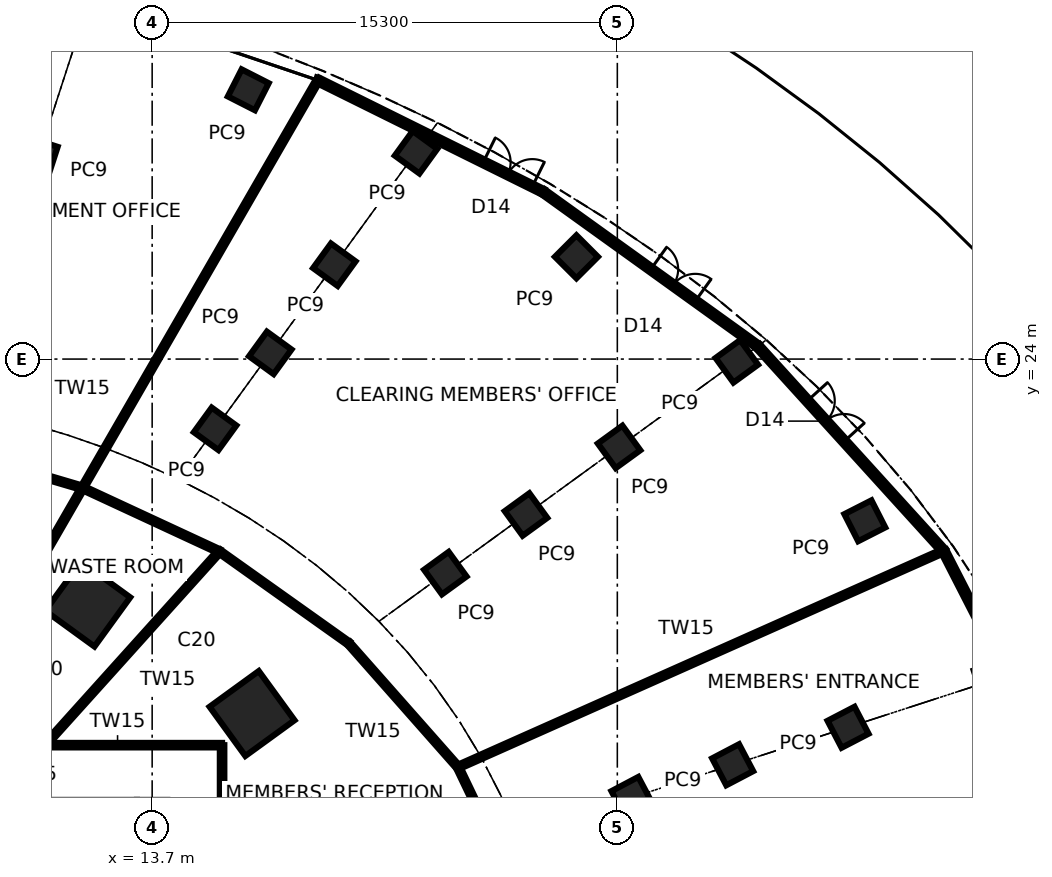
"""IFC4 building model, lengths in metres.
Left out: names, types, materials, properties, quantities, classifications, styles, units other than length and angle.
Written with IfcOpenShell. Run it as: python <this file> out.ifc"""

import sys

from ifc_helpers import new_model, si_unit, direction, frame, frame_2d, origin, origin_2d, place, context, subcontext, project, spatial, rectangle, extrude, element, fill, save


model = new_model("IFC4")
c1 = context("Model", 3, precision=1e-05, world=origin(), true_north=direction((0.0, 1.0)))
c2 = subcontext(c1, "Body", "Model", "MODEL_VIEW")
j1 = project(units=[si_unit("LENGTHUNIT", "METRE"), si_unit("PLANEANGLEUNIT", "RADIAN")], contexts=[c1])
p1 = place(None, origin())
s1 = spatial("IfcSite", under=j1, at=p1, CompositionType="ELEMENT")
p2 = place(p1, origin())
s2 = spatial("IfcBuilding", under=s1, at=p2, CompositionType="ELEMENT")
p3 = place(p2, origin())
s3 = spatial("IfcBuildingStorey", under=s2, at=p3, CompositionType="ELEMENT", Elevation=0.0)
for number, where, z_axis, x_axis in (
    (1, (16.986, 12.341, 0.0), (0.0, 0.0, 1.0), (0.809, 0.588, 0.0)),
    (2, (11.581, 15.94, 0.0), (0.0, 0.0, 1.0), (0.588, 0.809, 0.0)),
):
    element("IfcColumn", number, at=place(p3, frame(where, z_axis=z_axis, x_axis=x_axis)), inside=s3, PredefinedType="COLUMN", context=c2, shape_type="SweptSolid", body=[
        extrude(rectangle(XDim=2.0, YDim=2.0, at=origin_2d()), origin(), (0.0, 0.0, 1.0), 5.6),
    ])
for number, where, z_axis, x_axis in (
    (3, (37.141, 18.68, 0.0), (0.0, 0.0, 1.0), (0.891, 0.454, 0.0)),
    (4, (32.93, 23.925, 0.0), (0.0, 0.0, 1.0), (0.809, 0.588, 0.0)),
    (5, (27.655, 27.364, 0.0), (0.0, 0.0, 1.0), (0.707, 0.707, 0.0)),
    (6, (22.38, 30.803, 0.0), (0.0, 0.0, 1.0), (0.588, 0.809, 0.0)),
    (7, (16.862, 32.857, 0.0), (0.0, 0.0, 1.0), (0.454, 0.891, 0.0)),
    (8, (36.589, 11.888, 0.0), (0.0, 0.0, 1.0), (0.887, 0.461, 0.0)),
    (9, (29.057, 21.111, 0.0), (0.0, 0.0, 1.0), (0.809, 0.588, 0.0)),
    (10, (19.692, 27.103, 0.0), (0.0, 0.0, 1.0), (0.588, 0.809, 0.0)),
    (11, (9.962, 30.66, 0.0), (0.0, 0.0, 1.0), (0.309, 0.951, 0.0)),
    (12, (32.794, 10.655, 0.0), (0.0, 0.0, 1.0), (0.885, 0.465, 0.0)),
    (13, (25.997, 18.888, 0.0), (0.0, 0.0, 1.0), (0.809, 0.588, 0.0)),
    (14, (17.585, 24.204, 0.0), (0.0, 0.0, 1.0), (0.588, 0.809, 0.0)),
    (15, (29.482, 9.579, 0.0), (0.0, 0.0, 1.0), (0.884, 0.467, 0.0)),
    (16, (23.342, 16.959, 0.0), (0.0, 0.0, 1.0), (0.809, 0.588, 0.0)),
    (17, (15.77, 21.705, 0.0), (0.0, 0.0, 1.0), (0.588, 0.809, 0.0)),
):
    element("IfcColumn", number, at=place(p3, frame(where, z_axis=z_axis, x_axis=x_axis)), inside=s3, PredefinedType="COLUMN", context=c2, shape_type="SweptSolid", body=[
        extrude(rectangle(XDim=1.0, YDim=1.0, at=origin_2d()), origin(), (0.0, 0.0, 1.0), 5.6),
    ])
p4 = place(p3, frame((44.002, 9.353, 0.0), z_axis=(0.0, 0.0, 1.0), x_axis=(-0.455866804963, 0.890048007769, 0.0)))
e18 = element("IfcWall", 18, at=p4, inside=s3, PredefinedType="SOLIDWALL", context=c2, shape_type="SweptSolid", body=[
    extrude(rectangle(XDim=9.367, YDim=0.2, at=frame_2d((4.683, 0.0))), origin(), (0.0, 0.0, 1.0), 5.4),
])
p5 = place(p4, frame((0.4, 0.0, 0.0)))
e19 = element("IfcOpeningElement", 19, at=p5, cuts=e18, PredefinedType="OPENING", context=c2, shape_type="SweptSolid", body=[
    extrude(rectangle(XDim=1.8, YDim=2.7, at=frame_2d((0.9, 1.35))), frame((0.0, 0.11, 0.0), z_axis=(0.0, -1.0, 0.0), x_axis=(1.0, 0.0, 0.0)), (0.0, 0.0, 1.0), 0.22),
])
p6 = place(p3, frame((39.732, 17.69, 0.0), z_axis=(0.0, 0.0, 1.0), x_axis=(-0.672185050873, 0.740383182806, 0.0)))
e20 = element("IfcWall", 20, at=p6, inside=s3, PredefinedType="SOLIDWALL", context=c2, shape_type="SweptSolid", body=[
    extrude(rectangle(XDim=9.096, YDim=0.2, at=frame_2d((4.548, 0.0))), origin(), (0.0, 0.0, 1.0), 5.4),
])
p7 = place(p6, frame((4.866, 0.0, 0.0)))
e21 = element("IfcOpeningElement", 21, at=p7, cuts=e20, PredefinedType="OPENING", context=c2, shape_type="SweptSolid", body=[
    extrude(rectangle(XDim=1.8, YDim=2.7, at=frame_2d((0.9, 1.35))), frame((0.0, 0.11, 0.0), z_axis=(0.0, -1.0, 0.0), x_axis=(1.0, 0.0, 0.0)), (0.0, 0.0, 1.0), 0.22),
])
p8 = place(p3, frame((33.618, 24.425, 0.0), z_axis=(0.0, 0.0, 1.0), x_axis=(-0.811842698993, 0.583876212987, 0.0)))
e22 = element("IfcWall", 22, at=p8, inside=s3, PredefinedType="SOLIDWALL", context=c2, shape_type="SweptSolid", body=[
    extrude(rectangle(XDim=8.692, YDim=0.2, at=frame_2d((4.346, 0.0))), origin(), (0.0, 0.0, 1.0), 5.4),
])
p9 = place(p8, frame((2.532, 0.0, 0.0)))
e23 = element("IfcOpeningElement", 23, at=p9, cuts=e22, PredefinedType="OPENING", context=c2, shape_type="SweptSolid", body=[
    extrude(rectangle(XDim=1.8, YDim=2.7, at=frame_2d((0.9, 1.35))), frame((0.0, 0.11, 0.0), z_axis=(0.0, -1.0, 0.0), x_axis=(1.0, 0.0, 0.0)), (0.0, 0.0, 1.0), 0.22),
])
p10 = place(p3, frame((26.562, 29.5, 0.0), z_axis=(0.0, 0.0, 1.0), x_axis=(-0.896091912652, 0.443868543693, 0.0)))
e24 = element("IfcWall", 24, at=p10, inside=s3, PredefinedType="SOLIDWALL", context=c2, shape_type="SweptSolid", body=[
    extrude(rectangle(XDim=8.27, YDim=0.2, at=frame_2d((4.135, 0.0))), origin(), (0.0, 0.0, 1.0), 5.4),
])
p11 = place(p10, frame((0.4, 0.0, 0.0)))
e25 = element("IfcOpeningElement", 25, at=p11, cuts=e24, PredefinedType="OPENING", context=c2, shape_type="SweptSolid", body=[
    extrude(rectangle(XDim=1.8, YDim=2.7, at=frame_2d((0.9, 1.35))), frame((0.0, 0.11, 0.0), z_axis=(0.0, -1.0, 0.0), x_axis=(1.0, 0.0, 0.0)), (0.0, 0.0, 1.0), 0.22),
])
p12 = place(p3, frame((25.76, 6.409, 0.0), z_axis=(0.0, 0.0, 1.0), x_axis=(-0.432499372538, 0.901634234462, 0.0)))
e26 = element("IfcWall", 26, at=p12, inside=s3, PredefinedType="PARTITIONING", context=c2, shape_type="SweptSolid", body=[
    extrude(rectangle(XDim=4.625, YDim=0.15, at=frame_2d((2.312, 0.0))), origin(), (0.0, 0.0, 1.0), 5.4),
])
p13 = place(p12, frame((1.712, 0.0, 0.0)))
e27 = element("IfcOpeningElement", 27, at=p13, cuts=e26, PredefinedType="OPENING", context=c2, shape_type="SweptSolid", body=[
    extrude(rectangle(XDim=1.2, YDim=2.4, at=frame_2d((0.6, 1.2))), frame((0.0, 0.085, 0.0), z_axis=(0.0, -1.0, 0.0), x_axis=(1.0, 0.0, 0.0)), (0.0, 0.0, 1.0), 0.17),
])
p14 = place(p3, frame((23.76, 10.579, 0.0), z_axis=(0.0, 0.0, 1.0), x_axis=(0.913545837632, 0.406735789604, 0.0)))
e28 = element("IfcWall", 28, at=p14, inside=s3, PredefinedType="PARTITIONING", context=c2, shape_type="SweptSolid", body=[
    extrude(rectangle(XDim=17.404, YDim=0.15, at=frame_2d((8.702, 0.0))), origin(), (0.0, 0.0, 1.0), 5.4),
])
p15 = place(p3, frame((16.0, 3.401, 0.0), z_axis=(0.0, 0.0, 1.0), x_axis=(0.0, 1.0, 0.0)))
e29 = element("IfcWall", 29, at=p15, inside=s3, PredefinedType="PARTITIONING", context=c2, shape_type="SweptSolid", body=[
    extrude(rectangle(XDim=7.899, YDim=0.15, at=frame_2d((3.95, 0.0))), origin(), (0.0, 0.0, 1.0), 5.4),
])
p16 = place(p15, frame((3.375, 0.0, 0.0)))
e30 = element("IfcOpeningElement", 30, at=p16, cuts=e29, PredefinedType="OPENING", context=c2, shape_type="SweptSolid", body=[
    extrude(rectangle(XDim=1.2, YDim=2.4, at=frame_2d((0.6, 1.2))), frame((0.0, 0.085, 0.0), z_axis=(0.0, -1.0, 0.0), x_axis=(1.0, 0.0, 0.0)), (0.0, 0.0, 1.0), 0.17),
])
p17 = place(p3, frame((23.76, 10.579, 0.0), z_axis=(0.0, 0.0, 1.0), x_axis=(-0.661972392396, 0.749528219419, 0.0)))
e31 = element("IfcWall", 31, at=p17, inside=s3, PredefinedType="PARTITIONING", context=c2, shape_type="SweptSolid", body=[
    extrude(rectangle(XDim=5.432, YDim=0.15, at=frame_2d((2.716, 0.0))), origin(), (0.0, 0.0, 1.0), 5.4),
])
p18 = place(p3, frame((20.164, 14.65, 0.0), z_axis=(0.0, 0.0, 1.0), x_axis=(-0.81494599189, 0.579536910215, 0.0)))
e32 = element("IfcWall", 32, at=p18, inside=s3, PredefinedType="PARTITIONING", context=c2, shape_type="SweptSolid", body=[
    extrude(rectangle(XDim=5.217, YDim=0.15, at=frame_2d((2.608, 0.0))), origin(), (0.0, 0.0, 1.0), 5.4),
])
p19 = place(p3, frame((10.175, 11.3, 0.0), z_axis=(0.0, 0.0, 1.0), x_axis=(0.669128292476, 0.7431469089, 0.0)))
e33 = element("IfcWall", 33, at=p19, inside=s3, PredefinedType="PARTITIONING", context=c2, shape_type="SweptSolid", body=[
    extrude(rectangle(XDim=8.576, YDim=0.15, at=frame_2d((4.288, 0.0))), origin(), (0.0, 0.0, 1.0), 5.4),
])
p20 = place(p3, frame((15.913, 17.673, 0.0), z_axis=(0.0, 0.0, 1.0), x_axis=(-0.907108234971, 0.420897434119, 0.0)))
e34 = element("IfcWall", 34, at=p20, inside=s3, PredefinedType="PARTITIONING", context=c2, shape_type="SweptSolid", body=[
    extrude(rectangle(XDim=4.964, YDim=0.15, at=frame_2d((2.482, 0.0))), origin(), (0.0, 0.0, 1.0), 5.4),
])
p21 = place(p3, frame((16.0, 11.3, 0.0), z_axis=(0.0, 0.0, 1.0), x_axis=(-1.0, 0.0, 0.0)))
e35 = element("IfcWall", 35, at=p21, inside=s3, PredefinedType="PARTITIONING", context=c2, shape_type="SweptSolid", body=[
    extrude(rectangle(XDim=16.383, YDim=0.15, at=frame_2d((8.192, 0.0))), origin(), (0.0, 0.0, 1.0), 5.4),
])
p22 = place(p21, frame((7.026, 0.0, 0.0)))
e36 = element("IfcOpeningElement", 36, at=p22, cuts=e35, PredefinedType="OPENING", context=c2, shape_type="SweptSolid", body=[
    extrude(rectangle(XDim=1.2, YDim=2.4, at=frame_2d((0.6, 1.2))), frame((0.0, 0.085, 0.0), z_axis=(0.0, -1.0, 0.0), x_axis=(1.0, 0.0, 0.0)), (0.0, 0.0, 1.0), 0.17),
])
p23 = place(p21, frame((11.544, 0.0, 0.0)))
e37 = element("IfcOpeningElement", 37, at=p23, cuts=e35, PredefinedType="OPENING", context=c2, shape_type="SweptSolid", body=[
    extrude(rectangle(XDim=1.2, YDim=2.4, at=frame_2d((0.6, 1.2))), frame((0.0, 0.085, 0.0), z_axis=(0.0, -1.0, 0.0), x_axis=(1.0, 0.0, 0.0)), (0.0, 0.0, 1.0), 0.17),
])
p24 = place(p3, frame((6.524, 11.3, 0.0), z_axis=(0.0, 0.0, 1.0), x_axis=(0.499998368249, 0.866026345874, 0.0)))
e38 = element("IfcWall", 38, at=p24, inside=s3, PredefinedType="PARTITIONING", context=c2, shape_type="SweptSolid", body=[
    extrude(rectangle(XDim=25.174, YDim=0.15, at=frame_2d((12.587, 0.0))), origin(), (0.0, 0.0, 1.0), 5.4),
])
p25 = place(p3, frame((11.41, 19.762, 0.0), z_axis=(0.0, 0.0, 1.0), x_axis=(-0.959084076189, 0.283121413534, 0.0)))
e39 = element("IfcWall", 39, at=p25, inside=s3, PredefinedType="PARTITIONING", context=c2, shape_type="SweptSolid", body=[
    extrude(rectangle(XDim=4.746, YDim=0.15, at=frame_2d((2.373, 0.0))), origin(), (0.0, 0.0, 1.0), 5.4),
])
p26 = place(p7, frame((1.8, 0.0, 0.0), z_axis=(0.0, 0.0, 1.0), x_axis=(-1.0, 0.0, 0.0)))
e40 = element("IfcDoor", 40, at=p26, inside=s3, OperationType="DOUBLE_DOOR_SINGLE_SWING", PredefinedType="DOOR", context=c2, shape_type="SweptSolid", body=[
    extrude(rectangle(XDim=1.8, YDim=2.7, at=frame_2d((0.9, 1.35))), frame((0.0, 0.025, 0.0), z_axis=(0.0, -1.0, 0.0), x_axis=(1.0, 0.0, 0.0)), (0.0, 0.0, 1.0), 0.05),
])
fill(e21, e40)
p27 = place(p9, frame((1.8, 0.0, 0.0), z_axis=(0.0, 0.0, 1.0), x_axis=(-1.0, 0.0, 0.0)))
e41 = element("IfcDoor", 41, at=p27, inside=s3, OperationType="DOUBLE_DOOR_SINGLE_SWING", PredefinedType="DOOR", context=c2, shape_type="SweptSolid", body=[
    extrude(rectangle(XDim=1.8, YDim=2.7, at=frame_2d((0.9, 1.35))), frame((0.0, 0.025, 0.0), z_axis=(0.0, -1.0, 0.0), x_axis=(1.0, 0.0, 0.0)), (0.0, 0.0, 1.0), 0.05),
])
fill(e23, e41)
p28 = place(p11, frame((1.8, 0.0, 0.0), z_axis=(0.0, 0.0, 1.0), x_axis=(-1.0, 0.0, 0.0)))
e42 = element("IfcDoor", 42, at=p28, inside=s3, OperationType="DOUBLE_DOOR_SINGLE_SWING", PredefinedType="DOOR", context=c2, shape_type="SweptSolid", body=[
    extrude(rectangle(XDim=1.8, YDim=2.7, at=frame_2d((0.9, 1.35))), frame((0.0, 0.025, 0.0), z_axis=(0.0, -1.0, 0.0), x_axis=(1.0, 0.0, 0.0)), (0.0, 0.0, 1.0), 0.05),
])
fill(e25, e42)
save(model, sys.argv[1])
